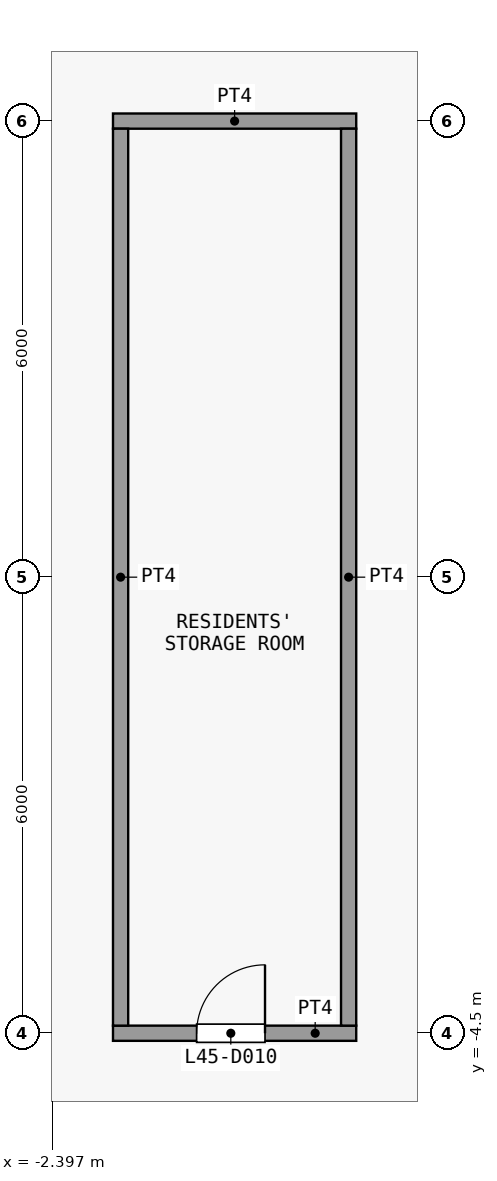
"""IFC4 building model, lengths in metres.
Left out: names, types, materials, properties, quantities, classifications, styles, units other than length and angle.
Written with IfcOpenShell. Run it as: python <this file> out.ifc"""

import sys

from ifc_helpers import new_model, si_unit, direction, frame, frame_2d, origin, place, context, subcontext, project, spatial, rectangle, extrude, element, fill, save


model = new_model("IFC4")
c1 = context("Model", 3, precision=1e-05, world=origin(), true_north=direction((0.0, 1.0)))
c2 = subcontext(c1, "Body", "Model", "MODEL_VIEW")
j1 = project(units=[si_unit("LENGTHUNIT", "METRE"), si_unit("PLANEANGLEUNIT", "RADIAN")], contexts=[c1])
p1 = place(None, origin())
s1 = spatial("IfcSite", under=j1, at=p1, CompositionType="ELEMENT")
p2 = place(p1, origin())
s2 = spatial("IfcBuilding", under=s1, at=p2, CompositionType="ELEMENT")
p3 = place(p2, frame((0.0, 0.0, 181.7)))
s3 = spatial("IfcBuildingStorey", under=s2, at=p3, CompositionType="ELEMENT", Elevation=181.7)
p4 = place(p3, frame((-1.6, -4.5, 0.0), z_axis=(0.0, 0.0, 1.0), x_axis=(1.0, 0.0, 0.0)))
e1 = element("IfcWall", 1, at=p4, inside=s3, PredefinedType="PARTITIONING", context=c2, shape_type="SweptSolid", body=[
    extrude(rectangle(XDim=3.2, YDim=0.2, at=frame_2d((1.6, 0.0))), origin(), (0.0, 0.0, 1.0), 3.3),
])
p5 = place(p4, frame((1.1, 0.0, 0.0)))
e2 = element("IfcOpeningElement", 2, at=p5, cuts=e1, PredefinedType="OPENING", context=c2, shape_type="SweptSolid", body=[
    extrude(rectangle(XDim=0.9, YDim=2.1, at=frame_2d((0.45, 1.05))), frame((0.0, 0.11, 0.0), z_axis=(0.0, -1.0, 0.0), x_axis=(1.0, 0.0, 0.0)), (0.0, 0.0, 1.0), 0.22),
])
p6 = place(p3, frame((-1.6, 7.5, 0.0), z_axis=(0.0, 0.0, 1.0), x_axis=(1.0, 0.0, 0.0)))
e3 = element("IfcWall", 3, at=p6, inside=s3, PredefinedType="PARTITIONING", context=c2, shape_type="SweptSolid", body=[
    extrude(rectangle(XDim=3.2, YDim=0.2, at=frame_2d((1.6, 0.0))), origin(), (0.0, 0.0, 1.0), 3.3),
])
for number, where, z_axis, x_axis in (
    (4, (-1.5, -4.4, 0.0), (0.0, 0.0, 1.0), (0.0, 1.0, 0.0)),
    (5, (1.5, -4.4, 0.0), (0.0, 0.0, 1.0), (0.0, 1.0, 0.0)),
):
    element("IfcWall", number, at=place(p3, frame(where, z_axis=z_axis, x_axis=x_axis)), inside=s3, PredefinedType="PARTITIONING", context=c2, shape_type="SweptSolid", body=[
        extrude(rectangle(XDim=11.8, YDim=0.2, at=frame_2d((5.9, 0.0))), origin(), (0.0, 0.0, 1.0), 3.3),
    ])
p7 = place(p5, origin())
e6 = element("IfcDoor", 6, at=p7, inside=s3, OperationType="SINGLE_SWING_LEFT", PredefinedType="DOOR", context=c2, shape_type="SweptSolid", body=[
    extrude(rectangle(XDim=0.9, YDim=2.1, at=frame_2d((0.45, 1.05))), frame((0.0, 0.025, 0.0), z_axis=(0.0, -1.0, 0.0), x_axis=(1.0, 0.0, 0.0)), (0.0, 0.0, 1.0), 0.05),
])
fill(e2, e6)
save(model, sys.argv[1])
